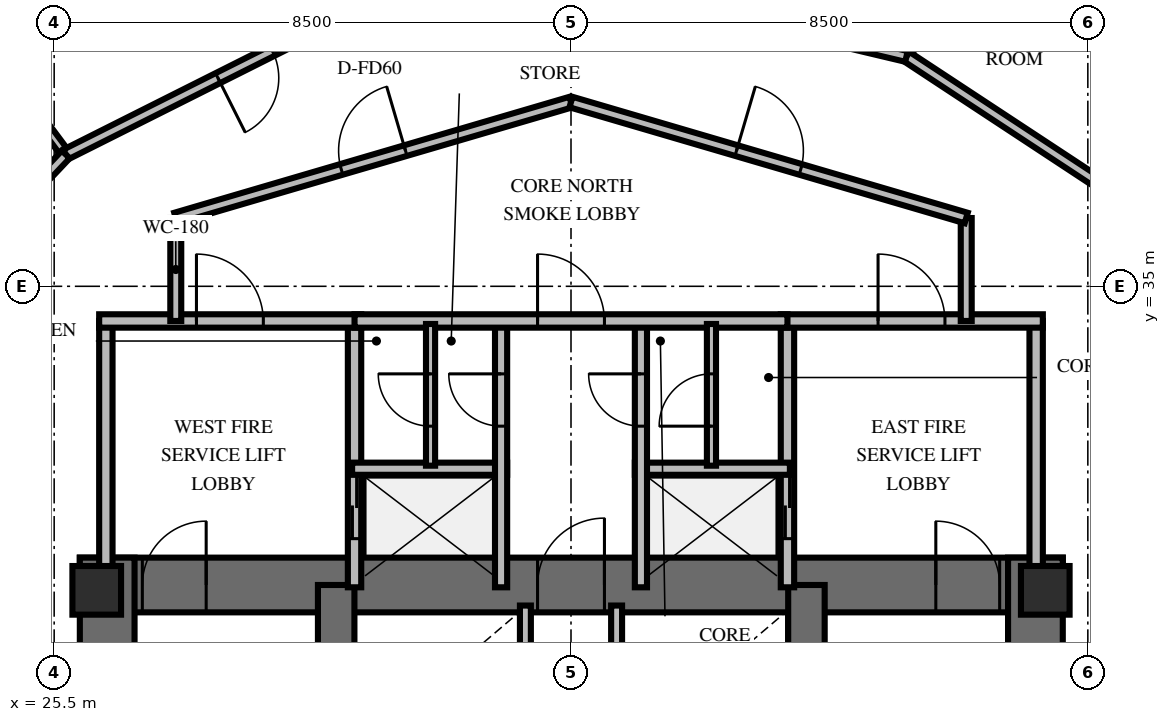
"""IFC4 building model, lengths in metres.
Left out: names, types, materials, properties, quantities, classifications, styles, units other than length and angle.
Written with IfcOpenShell. Run it as: python <this file> out.ifc"""

import sys

from ifc_helpers import new_model, si_unit, direction, frame, frame_2d, origin, origin_2d, place, context, subcontext, project, spatial, rectangle, extrude, element, fill, save


model = new_model("IFC4")
c1 = context("Model", 3, precision=1e-05, world=origin(), true_north=direction((0.0, 1.0)))
c2 = subcontext(c1, "Body", "Model", "MODEL_VIEW")
j1 = project(units=[si_unit("LENGTHUNIT", "METRE"), si_unit("PLANEANGLEUNIT", "RADIAN")], contexts=[c1])
p1 = place(None, origin())
s1 = spatial("IfcSite", under=j1, at=p1, CompositionType="ELEMENT")
p2 = place(p1, origin())
s2 = spatial("IfcBuilding", under=s1, at=p2, CompositionType="ELEMENT")
p3 = place(p2, frame((0.0, 0.0, 59.4)))
s3 = spatial("IfcBuildingStorey", under=s2, at=p3, CompositionType="ELEMENT", Elevation=59.4)
p4 = place(p3, frame((25.922, 30.088, 0.0), z_axis=(0.0, 0.0, 1.0), x_axis=(1.0, 0.0, 0.0)))
e1 = element("IfcWall", 1, at=p4, inside=s3, PredefinedType="SHEAR", context=c2, shape_type="SweptSolid", body=[
    extrude(rectangle(XDim=16.166, YDim=0.9, at=frame_2d((8.083, 0.0))), origin(), (0.0, 0.0, 1.0), 4.2),
])
p5 = place(p4, frame((1.028, 0.0, 0.0)))
e2 = element("IfcOpeningElement", 2, at=p5, cuts=e1, PredefinedType="OPENING", context=c2, shape_type="SweptSolid", body=[
    extrude(rectangle(XDim=1.05, YDim=2.15, at=frame_2d((0.525, 1.075))), frame((0.0, 0.46, 0.0), z_axis=(0.0, -1.0, 0.0), x_axis=(1.0, 0.0, 0.0)), (0.0, 0.0, 1.0), 0.92),
])
p6 = place(p4, frame((14.078, 0.0, 0.0)))
e3 = element("IfcOpeningElement", 3, at=p6, cuts=e1, PredefinedType="OPENING", context=c2, shape_type="SweptSolid", body=[
    extrude(rectangle(XDim=1.05, YDim=2.15, at=frame_2d((0.525, 1.075))), frame((0.0, 0.46, 0.0), z_axis=(0.0, -1.0, 0.0), x_axis=(1.0, 0.0, 0.0)), (0.0, 0.0, 1.0), 0.92),
])
p7 = place(p4, frame((7.528, 0.0, 0.0)))
e4 = element("IfcOpeningElement", 4, at=p7, cuts=e1, PredefinedType="OPENING", context=c2, shape_type="SweptSolid", body=[
    extrude(rectangle(XDim=1.1, YDim=2.15, at=frame_2d((0.55, 1.075))), frame((0.0, 0.46, 0.0), z_axis=(0.0, -1.0, 0.0), x_axis=(1.0, 0.0, 0.0)), (0.0, 0.0, 1.0), 0.92),
])
for number, where, z_axis, x_axis in (
    (5, (26.372, 19.662, 0.0), (0.0, 0.0, 1.0), (0.0, 1.0, 0.0)),
    (6, (41.638, 19.662, 0.0), (0.0, 0.0, 1.0), (0.0, 1.0, 0.0)),
):
    element("IfcWall", number, at=place(p3, frame(where, z_axis=z_axis, x_axis=x_axis)), inside=s3, PredefinedType="SHEAR", context=c2, shape_type="SweptSolid", body=[
        extrude(rectangle(XDim=10.876, YDim=0.9, at=frame_2d((5.438, 0.0))), origin(), (0.0, 0.0, 1.0), 4.2),
    ])
for number, where, z_axis, x_axis in (
    (7, (30.138, 20.112, 0.0), (0.0, 0.0, 1.0), (0.0, 1.0, 0.0)),
    (8, (37.872, 20.112, 0.0), (0.0, 0.0, 1.0), (0.0, 1.0, 0.0)),
):
    element("IfcWall", number, at=place(p3, frame(where, z_axis=z_axis, x_axis=x_axis)), inside=s3, PredefinedType="SHEAR", context=c2, shape_type="SweptSolid", body=[
        extrude(rectangle(XDim=9.976, YDim=0.6, at=frame_2d((4.988, 0.0))), origin(), (0.0, 0.0, 1.0), 4.2),
    ])
for number, where, z_axis, x_axis in (
    (9, (26.2, 30.0, 0.0), (0.0, 0.0, 1.0), (1.0, 0.0, 0.0)),
    (10, (41.8, 30.0, 0.0), (0.0, 0.0, 1.0), (1.0, 0.0, 0.0)),
):
    element("IfcColumn", number, at=place(p3, frame(where, z_axis=z_axis, x_axis=x_axis)), inside=s3, PredefinedType="PILASTER", context=c2, shape_type="SweptSolid", body=[
        extrude(rectangle(XDim=0.8, YDim=0.8, at=origin_2d()), origin(), (0.0, 0.0, 1.0), 4.2),
    ])
p8 = place(p3, frame((26.35, 30.05, 0.0), z_axis=(0.0, 0.0, 1.0), x_axis=(0.0, 1.0, 0.0)))
e11 = element("IfcWall", 11, at=p8, inside=s3, PredefinedType="SOLIDWALL", context=c2, shape_type="SweptSolid", body=[
    extrude(rectangle(XDim=4.38, YDim=0.22, at=frame_2d((2.19, 0.0))), origin(), (0.0, 0.0, 1.0), 3.0),
])
p9 = place(p3, frame((30.44, 30.05, 0.0), z_axis=(0.0, 0.0, 1.0), x_axis=(0.0, 1.0, 0.0)))
e12 = element("IfcWall", 12, at=p9, inside=s3, PredefinedType="SOLIDWALL", context=c2, shape_type="SweptSolid", body=[
    extrude(rectangle(XDim=4.38, YDim=0.22, at=frame_2d((2.19, 0.0))), origin(), (0.0, 0.0, 1.0), 3.0),
])
p10 = place(p9, frame((0.8, 0.0, 0.0)))
e13 = element("IfcOpeningElement", 13, at=p10, cuts=e12, PredefinedType="OPENING", context=c2, shape_type="SweptSolid", body=[
    extrude(rectangle(XDim=1.05, YDim=2.1, at=frame_2d((0.525, 1.05))), frame((0.0, 0.12, 0.0), z_axis=(0.0, -1.0, 0.0), x_axis=(1.0, 0.0, 0.0)), (0.0, 0.0, 1.0), 0.24),
])
p11 = place(p3, frame((26.24, 34.43, 0.0), z_axis=(0.0, 0.0, 1.0), x_axis=(1.0, 0.0, 0.0)))
e14 = element("IfcWall", 14, at=p11, inside=s3, PredefinedType="SOLIDWALL", context=c2, shape_type="SweptSolid", body=[
    extrude(rectangle(XDim=4.31, YDim=0.22, at=frame_2d((2.155, 0.0))), origin(), (0.0, 0.0, 1.0), 3.0),
])
p12 = place(p11, frame((1.6, 0.0, 0.0)))
e15 = element("IfcOpeningElement", 15, at=p12, cuts=e14, PredefinedType="OPENING", context=c2, shape_type="SweptSolid", body=[
    extrude(rectangle(XDim=1.1, YDim=2.15, at=frame_2d((0.55, 1.075))), frame((0.0, 0.12, 0.0), z_axis=(0.0, -1.0, 0.0), x_axis=(1.0, 0.0, 0.0)), (0.0, 0.0, 1.0), 0.24),
])
p13 = place(p3, frame((30.4, 32.0, 0.0), z_axis=(0.0, 0.0, 1.0), x_axis=(1.0, 0.0, 0.0)))
e16 = element("IfcWall", 16, at=p13, inside=s3, PredefinedType="SOLIDWALL", context=c2, shape_type="SweptSolid", body=[
    extrude(rectangle(XDim=2.55, YDim=0.2, at=frame_2d((1.275, 0.0))), origin(), (0.0, 0.0, 1.0), 3.0),
])
p14 = place(p3, frame((32.85, 30.05, 0.0), z_axis=(0.0, 0.0, 1.0), x_axis=(0.0, 1.0, 0.0)))
e17 = element("IfcWall", 17, at=p14, inside=s3, PredefinedType="SOLIDWALL", context=c2, shape_type="SweptSolid", body=[
    extrude(rectangle(XDim=4.38, YDim=0.2, at=frame_2d((2.19, 0.0))), origin(), (0.0, 0.0, 1.0), 3.0),
])
p15 = place(p14, frame((2.65, 0.0, 0.0)))
e18 = element("IfcOpeningElement", 18, at=p15, cuts=e17, PredefinedType="OPENING", context=c2, shape_type="SweptSolid", body=[
    extrude(rectangle(XDim=0.86, YDim=2.05, at=frame_2d((0.43, 1.025))), frame((0.0, 0.11, 0.0), z_axis=(0.0, -1.0, 0.0), x_axis=(1.0, 0.0, 0.0)), (0.0, 0.0, 1.0), 0.22),
])
p16 = place(p3, frame((37.56, 30.05, 0.0), z_axis=(0.0, 0.0, 1.0), x_axis=(0.0, 1.0, 0.0)))
e19 = element("IfcWall", 19, at=p16, inside=s3, PredefinedType="SOLIDWALL", context=c2, shape_type="SweptSolid", body=[
    extrude(rectangle(XDim=4.38, YDim=0.22, at=frame_2d((2.19, 0.0))), origin(), (0.0, 0.0, 1.0), 3.0),
])
p17 = place(p16, frame((0.8, 0.0, 0.0)))
e20 = element("IfcOpeningElement", 20, at=p17, cuts=e19, PredefinedType="OPENING", context=c2, shape_type="SweptSolid", body=[
    extrude(rectangle(XDim=1.05, YDim=2.1, at=frame_2d((0.525, 1.05))), frame((0.0, 0.12, 0.0), z_axis=(0.0, -1.0, 0.0), x_axis=(1.0, 0.0, 0.0)), (0.0, 0.0, 1.0), 0.24),
])
p18 = place(p3, frame((41.65, 30.05, 0.0), z_axis=(0.0, 0.0, 1.0), x_axis=(0.0, 1.0, 0.0)))
e21 = element("IfcWall", 21, at=p18, inside=s3, PredefinedType="SOLIDWALL", context=c2, shape_type="SweptSolid", body=[
    extrude(rectangle(XDim=4.38, YDim=0.22, at=frame_2d((2.19, 0.0))), origin(), (0.0, 0.0, 1.0), 3.0),
])
p19 = place(p3, frame((37.45, 34.43, 0.0), z_axis=(0.0, 0.0, 1.0), x_axis=(1.0, 0.0, 0.0)))
e22 = element("IfcWall", 22, at=p19, inside=s3, PredefinedType="SOLIDWALL", context=c2, shape_type="SweptSolid", body=[
    extrude(rectangle(XDim=4.31, YDim=0.22, at=frame_2d((2.155, 0.0))), origin(), (0.0, 0.0, 1.0), 3.0),
])
p20 = place(p19, frame((1.6, 0.0, 0.0)))
e23 = element("IfcOpeningElement", 23, at=p20, cuts=e22, PredefinedType="OPENING", context=c2, shape_type="SweptSolid", body=[
    extrude(rectangle(XDim=1.1, YDim=2.15, at=frame_2d((0.55, 1.075))), frame((0.0, 0.12, 0.0), z_axis=(0.0, -1.0, 0.0), x_axis=(1.0, 0.0, 0.0)), (0.0, 0.0, 1.0), 0.24),
])
p21 = place(p3, frame((35.05, 32.0, 0.0), z_axis=(0.0, 0.0, 1.0), x_axis=(1.0, 0.0, 0.0)))
e24 = element("IfcWall", 24, at=p21, inside=s3, PredefinedType="SOLIDWALL", context=c2, shape_type="SweptSolid", body=[
    extrude(rectangle(XDim=2.55, YDim=0.2, at=frame_2d((1.275, 0.0))), origin(), (0.0, 0.0, 1.0), 3.0),
])
p22 = place(p3, frame((35.15, 30.05, 0.0), z_axis=(0.0, 0.0, 1.0), x_axis=(0.0, 1.0, 0.0)))
e25 = element("IfcWall", 25, at=p22, inside=s3, PredefinedType="SOLIDWALL", context=c2, shape_type="SweptSolid", body=[
    extrude(rectangle(XDim=4.38, YDim=0.2, at=frame_2d((2.19, 0.0))), origin(), (0.0, 0.0, 1.0), 3.0),
])
p23 = place(p22, frame((2.65, 0.0, 0.0)))
e26 = element("IfcOpeningElement", 26, at=p23, cuts=e25, PredefinedType="OPENING", context=c2, shape_type="SweptSolid", body=[
    extrude(rectangle(XDim=0.86, YDim=2.05, at=frame_2d((0.43, 1.025))), frame((0.0, 0.11, 0.0), z_axis=(0.0, -1.0, 0.0), x_axis=(1.0, 0.0, 0.0)), (0.0, 0.0, 1.0), 0.22),
])
p24 = place(p3, frame((30.44, 34.43, 0.0), z_axis=(0.0, 0.0, 1.0), x_axis=(1.0, 0.0, 0.0)))
e27 = element("IfcWall", 27, at=p24, inside=s3, PredefinedType="SOLIDWALL", context=c2, shape_type="SweptSolid", body=[
    extrude(rectangle(XDim=7.12, YDim=0.22, at=frame_2d((3.56, 0.0))), origin(), (0.0, 0.0, 1.0), 3.0),
])
p25 = place(p24, frame((3.01, 0.0, 0.0)))
e28 = element("IfcOpeningElement", 28, at=p25, cuts=e27, PredefinedType="OPENING", context=c2, shape_type="SweptSolid", body=[
    extrude(rectangle(XDim=1.1, YDim=2.15, at=frame_2d((0.55, 1.075))), frame((0.0, 0.12, 0.0), z_axis=(0.0, -1.0, 0.0), x_axis=(1.0, 0.0, 0.0)), (0.0, 0.0, 1.0), 0.24),
])
p26 = place(p3, frame((31.69, 32.05, 0.0), z_axis=(0.0, 0.0, 1.0), x_axis=(0.0, 1.0, 0.0)))
e29 = element("IfcWall", 29, at=p26, inside=s3, PredefinedType="PARTITIONING", context=c2, shape_type="SweptSolid", body=[
    extrude(rectangle(XDim=2.33, YDim=0.15, at=frame_2d((1.165, 0.0))), origin(), (0.0, 0.0, 1.0), 3.0),
])
p27 = place(p26, frame((0.65, 0.0, 0.0)))
e30 = element("IfcOpeningElement", 30, at=p27, cuts=e29, PredefinedType="OPENING", context=c2, shape_type="SweptSolid", body=[
    extrude(rectangle(XDim=0.86, YDim=2.05, at=frame_2d((0.43, 1.025))), frame((0.0, 0.085, 0.0), z_axis=(0.0, -1.0, 0.0), x_axis=(1.0, 0.0, 0.0)), (0.0, 0.0, 1.0), 0.17),
])
p28 = place(p3, frame((36.31, 32.05, 0.0), z_axis=(0.0, 0.0, 1.0), x_axis=(0.0, 1.0, 0.0)))
e31 = element("IfcWall", 31, at=p28, inside=s3, PredefinedType="PARTITIONING", context=c2, shape_type="SweptSolid", body=[
    extrude(rectangle(XDim=2.33, YDim=0.15, at=frame_2d((1.165, 0.0))), origin(), (0.0, 0.0, 1.0), 3.0),
])
p29 = place(p28, frame((0.65, 0.0, 0.0)))
e32 = element("IfcOpeningElement", 32, at=p29, cuts=e31, PredefinedType="OPENING", context=c2, shape_type="SweptSolid", body=[
    extrude(rectangle(XDim=0.86, YDim=2.05, at=frame_2d((0.43, 1.025))), frame((0.0, 0.085, 0.0), z_axis=(0.0, -1.0, 0.0), x_axis=(1.0, 0.0, 0.0)), (0.0, 0.0, 1.0), 0.17),
])
for number, where, z_axis, x_axis in (
    (33, (33.25, 27.28, 0.0), (0.0, 0.0, 1.0), (0.0, 1.0, 0.0)),
    (34, (34.75, 27.28, 0.0), (0.0, 0.0, 1.0), (0.0, 1.0, 0.0)),
):
    element("IfcWall", number, at=place(p3, frame(where, z_axis=z_axis, x_axis=x_axis)), inside=s3, PredefinedType="SOLIDWALL", context=c2, shape_type="SweptSolid", body=[
        extrude(rectangle(XDim=2.47, YDim=0.18, at=frame_2d((1.235, 0.0))), origin(), (0.0, 0.0, 1.0), 3.0),
    ])
for number, where, z_axis, x_axis in (
    (35, (27.5, 34.43, 0.0), (0.0, 0.0, 1.0), (0.0, 1.0, 0.0)),
    (36, (40.5, 36.123, 0.0), (0.0, 0.0, 1.0), (0.0, -1.0, 0.0)),
):
    element("IfcWall", number, at=place(p3, frame(where, z_axis=z_axis, x_axis=x_axis)), inside=s3, PredefinedType="PARTITIONING", context=c2, shape_type="SweptSolid", body=[
        extrude(rectangle(XDim=1.693, YDim=0.18, at=frame_2d((0.846, 0.0))), origin(), (0.0, 0.0, 1.0), 3.0),
    ])
p30 = place(p3, frame((27.5, 36.123, 0.0), z_axis=(0.0, 0.0, 1.0), x_axis=(0.959546654541, 0.281549671923, 0.0)))
e37 = element("IfcWall", 37, at=p30, inside=s3, PredefinedType="PARTITIONING", context=c2, shape_type="SweptSolid", body=[
    extrude(rectangle(XDim=6.774, YDim=0.18, at=frame_2d((3.387, 0.0))), origin(), (0.0, 0.0, 1.0), 3.0),
])
p31 = place(p30, frame((2.837, 0.0, 0.0)))
e38 = element("IfcOpeningElement", 38, at=p31, cuts=e37, PredefinedType="OPENING", context=c2, shape_type="SweptSolid", body=[
    extrude(rectangle(XDim=1.1, YDim=2.15, at=frame_2d((0.55, 1.075))), frame((0.0, 0.1, 0.0), z_axis=(0.0, -1.0, 0.0), x_axis=(1.0, 0.0, 0.0)), (0.0, 0.0, 1.0), 0.2),
])
p32 = place(p3, frame((34.0, 38.03, 0.0), z_axis=(0.0, 0.0, 1.0), x_axis=(0.959546654541, -0.281549671923, 0.0)))
e39 = element("IfcWall", 39, at=p32, inside=s3, PredefinedType="PARTITIONING", context=c2, shape_type="SweptSolid", body=[
    extrude(rectangle(XDim=6.774, YDim=0.18, at=frame_2d((3.387, 0.0))), origin(), (0.0, 0.0, 1.0), 3.0),
])
p33 = place(p32, frame((2.837, 0.0, 0.0)))
e40 = element("IfcOpeningElement", 40, at=p33, cuts=e39, PredefinedType="OPENING", context=c2, shape_type="SweptSolid", body=[
    extrude(rectangle(XDim=1.1, YDim=2.15, at=frame_2d((0.55, 1.075))), frame((0.0, 0.1, 0.0), z_axis=(0.0, -1.0, 0.0), x_axis=(1.0, 0.0, 0.0)), (0.0, 0.0, 1.0), 0.2),
])
p34 = place(p3, frame((39.517, 38.78, 0.0), z_axis=(0.0, 0.0, 1.0), x_axis=(0.396341092722, 0.918103337441, 0.0)))
e41 = element("IfcWall", 41, at=p34, inside=s3, PredefinedType="PARTITIONING", context=c2, shape_type="SweptSolid", body=[
    extrude(rectangle(XDim=8.573, YDim=0.15, at=frame_2d((4.286, 0.0))), origin(), (0.0, 0.0, 1.0), 3.0),
])
p35 = place(p3, frame((43.555, 36.122, 0.0), z_axis=(0.0, 0.0, 1.0), x_axis=(-0.835329812405, 0.549749128701, 0.0)))
e42 = element("IfcWall", 42, at=p35, inside=s3, PredefinedType="PARTITIONING", context=c2, shape_type="SweptSolid", body=[
    extrude(rectangle(XDim=4.834, YDim=0.18, at=frame_2d((2.417, 0.0))), origin(), (0.0, 0.0, 1.0), 3.0),
])
p36 = place(p3, frame((45.134, 37.795, 0.0), z_axis=(0.0, 0.0, 1.0), x_axis=(-0.835342710948, 0.549729529193, 0.0)))
e43 = element("IfcWall", 43, at=p36, inside=s3, PredefinedType="PARTITIONING", context=c2, shape_type="SweptSolid", body=[
    extrude(rectangle(XDim=5.633, YDim=0.15, at=frame_2d((2.816, 0.0))), origin(), (0.0, 0.0, 1.0), 3.0),
])
p37 = place(p3, frame((25.691, 37.168, 0.0), z_axis=(0.0, 0.0, 1.0), x_axis=(-0.596933618422, 0.802290630132, 0.0)))
e44 = element("IfcWall", 44, at=p37, inside=s3, PredefinedType="PARTITIONING", context=c2, shape_type="SweptSolid", body=[
    extrude(rectangle(XDim=8.573, YDim=0.15, at=frame_2d((4.286, 0.0))), origin(), (0.0, 0.0, 1.0), 3.0),
])
p38 = place(p3, frame((39.517, 38.78, 0.0), z_axis=(0.0, 0.0, 1.0), x_axis=(-0.97297826036, 0.230896740702, 0.0)))
e45 = element("IfcWall", 45, at=p38, inside=s3, PredefinedType="PARTITIONING", context=c2, shape_type="SweptSolid", body=[
    extrude(rectangle(XDim=4.834, YDim=0.18, at=frame_2d((2.417, 0.0))), origin(), (0.0, 0.0, 1.0), 3.0),
])
p39 = place(p3, frame((30.012, 39.336, 0.0), z_axis=(0.0, 0.0, 1.0), x_axis=(-0.893759589468, -0.44854631448, 0.0)))
e46 = element("IfcWall", 46, at=p39, inside=s3, PredefinedType="PARTITIONING", context=c2, shape_type="SweptSolid", body=[
    extrude(rectangle(XDim=4.834, YDim=0.18, at=frame_2d((2.417, 0.0))), origin(), (0.0, 0.0, 1.0), 3.0),
])
p40 = place(p39, frame((1.034, 0.0, 0.0)))
e47 = element("IfcOpeningElement", 47, at=p40, cuts=e46, PredefinedType="OPENING", context=c2, shape_type="SweptSolid", body=[
    extrude(rectangle(XDim=1.0, YDim=2.15, at=frame_2d((0.5, 1.075))), frame((0.0, 0.1, 0.0), z_axis=(0.0, -1.0, 0.0), x_axis=(1.0, 0.0, 0.0)), (0.0, 0.0, 1.0), 0.2),
])
p41 = place(p3, frame((25.691, 37.168, 0.0), z_axis=(0.0, 0.0, 1.0), x_axis=(-0.68646187942, -0.727165791346, 0.0)))
e48 = element("IfcWall", 48, at=p41, inside=s3, PredefinedType="PARTITIONING", context=c2, shape_type="SweptSolid", body=[
    extrude(rectangle(XDim=4.834, YDim=0.18, at=frame_2d((2.417, 0.0))), origin(), (0.0, 0.0, 1.0), 3.0),
])
p42 = place(p5, origin())
e49 = element("IfcDoor", 49, at=p42, inside=s3, OperationType="SINGLE_SWING_RIGHT", PredefinedType="DOOR", context=c2, shape_type="SweptSolid", body=[
    extrude(rectangle(XDim=1.05, YDim=2.15, at=frame_2d((0.525, 1.075))), frame((0.0, 0.025, 0.0), z_axis=(0.0, -1.0, 0.0), x_axis=(1.0, 0.0, 0.0)), (0.0, 0.0, 1.0), 0.05),
])
fill(e2, e49)
p43 = place(p6, origin())
e50 = element("IfcDoor", 50, at=p43, inside=s3, OperationType="SINGLE_SWING_LEFT", PredefinedType="DOOR", context=c2, shape_type="SweptSolid", body=[
    extrude(rectangle(XDim=1.05, YDim=2.15, at=frame_2d((0.525, 1.075))), frame((0.0, 0.025, 0.0), z_axis=(0.0, -1.0, 0.0), x_axis=(1.0, 0.0, 0.0)), (0.0, 0.0, 1.0), 0.05),
])
fill(e3, e50)
p44 = place(p7, origin())
e51 = element("IfcDoor", 51, at=p44, inside=s3, OperationType="SINGLE_SWING_RIGHT", PredefinedType="DOOR", context=c2, shape_type="SweptSolid", body=[
    extrude(rectangle(XDim=1.1, YDim=2.15, at=frame_2d((0.55, 1.075))), frame((0.0, 0.025, 0.0), z_axis=(0.0, -1.0, 0.0), x_axis=(1.0, 0.0, 0.0)), (0.0, 0.0, 1.0), 0.05),
])
fill(e4, e51)
p45 = place(p12, origin())
e52 = element("IfcDoor", 52, at=p45, inside=s3, OperationType="SINGLE_SWING_LEFT", PredefinedType="DOOR", context=c2, shape_type="SweptSolid", body=[
    extrude(rectangle(XDim=1.1, YDim=2.15, at=frame_2d((0.55, 1.075))), frame((0.0, 0.025, 0.0), z_axis=(0.0, -1.0, 0.0), x_axis=(1.0, 0.0, 0.0)), (0.0, 0.0, 1.0), 0.05),
])
fill(e15, e52)
p46 = place(p10, origin())
e53 = element("IfcDoor", 53, at=p46, inside=s3, OperationType="DOUBLE_DOOR_SLIDING", PredefinedType="USERDEFINED", context=c2, shape_type="SweptSolid", body=[
    extrude(rectangle(XDim=1.05, YDim=2.1, at=frame_2d((0.525, 1.05))), frame((0.0, 0.025, 0.0), z_axis=(0.0, -1.0, 0.0), x_axis=(1.0, 0.0, 0.0)), (0.0, 0.0, 1.0), 0.05),
])
fill(e13, e53)
p47 = place(p15, origin())
e54 = element("IfcDoor", 54, at=p47, inside=s3, OperationType="SINGLE_SWING_RIGHT", PredefinedType="TRAPDOOR", context=c2, shape_type="SweptSolid", body=[
    extrude(rectangle(XDim=0.86, YDim=2.05, at=frame_2d((0.43, 1.025))), frame((0.0, 0.025, 0.0), z_axis=(0.0, -1.0, 0.0), x_axis=(1.0, 0.0, 0.0)), (0.0, 0.0, 1.0), 0.05),
])
fill(e18, e54)
p48 = place(p20, origin())
e55 = element("IfcDoor", 55, at=p48, inside=s3, OperationType="SINGLE_SWING_LEFT", PredefinedType="DOOR", context=c2, shape_type="SweptSolid", body=[
    extrude(rectangle(XDim=1.1, YDim=2.15, at=frame_2d((0.55, 1.075))), frame((0.0, 0.025, 0.0), z_axis=(0.0, -1.0, 0.0), x_axis=(1.0, 0.0, 0.0)), (0.0, 0.0, 1.0), 0.05),
])
fill(e23, e55)
p49 = place(p17, origin())
e56 = element("IfcDoor", 56, at=p49, inside=s3, OperationType="DOUBLE_DOOR_SLIDING", PredefinedType="USERDEFINED", context=c2, shape_type="SweptSolid", body=[
    extrude(rectangle(XDim=1.05, YDim=2.1, at=frame_2d((0.525, 1.05))), frame((0.0, 0.025, 0.0), z_axis=(0.0, -1.0, 0.0), x_axis=(1.0, 0.0, 0.0)), (0.0, 0.0, 1.0), 0.05),
])
fill(e20, e56)
p50 = place(p23, origin())
e57 = element("IfcDoor", 57, at=p50, inside=s3, OperationType="SINGLE_SWING_RIGHT", PredefinedType="TRAPDOOR", context=c2, shape_type="SweptSolid", body=[
    extrude(rectangle(XDim=0.86, YDim=2.05, at=frame_2d((0.43, 1.025))), frame((0.0, 0.025, 0.0), z_axis=(0.0, -1.0, 0.0), x_axis=(1.0, 0.0, 0.0)), (0.0, 0.0, 1.0), 0.05),
])
fill(e26, e57)
p51 = place(p25, origin())
e58 = element("IfcDoor", 58, at=p51, inside=s3, OperationType="SINGLE_SWING_LEFT", PredefinedType="DOOR", context=c2, shape_type="SweptSolid", body=[
    extrude(rectangle(XDim=1.1, YDim=2.15, at=frame_2d((0.55, 1.075))), frame((0.0, 0.025, 0.0), z_axis=(0.0, -1.0, 0.0), x_axis=(1.0, 0.0, 0.0)), (0.0, 0.0, 1.0), 0.05),
])
fill(e28, e58)
p52 = place(p27, origin())
e59 = element("IfcDoor", 59, at=p52, inside=s3, OperationType="SINGLE_SWING_RIGHT", PredefinedType="TRAPDOOR", context=c2, shape_type="SweptSolid", body=[
    extrude(rectangle(XDim=0.86, YDim=2.05, at=frame_2d((0.43, 1.025))), frame((0.0, 0.025, 0.0), z_axis=(0.0, -1.0, 0.0), x_axis=(1.0, 0.0, 0.0)), (0.0, 0.0, 1.0), 0.05),
])
fill(e30, e59)
p53 = place(p29, origin())
e60 = element("IfcDoor", 60, at=p53, inside=s3, OperationType="SINGLE_SWING_LEFT", PredefinedType="TRAPDOOR", context=c2, shape_type="SweptSolid", body=[
    extrude(rectangle(XDim=0.86, YDim=2.05, at=frame_2d((0.43, 1.025))), frame((0.0, 0.025, 0.0), z_axis=(0.0, -1.0, 0.0), x_axis=(1.0, 0.0, 0.0)), (0.0, 0.0, 1.0), 0.05),
])
fill(e32, e60)
p54 = place(p31, origin())
e61 = element("IfcDoor", 61, at=p54, inside=s3, OperationType="SINGLE_SWING_RIGHT", PredefinedType="DOOR", context=c2, shape_type="SweptSolid", body=[
    extrude(rectangle(XDim=1.1, YDim=2.15, at=frame_2d((0.55, 1.075))), frame((0.0, 0.025, 0.0), z_axis=(0.0, -1.0, 0.0), x_axis=(1.0, 0.0, 0.0)), (0.0, 0.0, 1.0), 0.05),
])
fill(e38, e61)
p55 = place(p33, origin())
e62 = element("IfcDoor", 62, at=p55, inside=s3, OperationType="SINGLE_SWING_LEFT", PredefinedType="DOOR", context=c2, shape_type="SweptSolid", body=[
    extrude(rectangle(XDim=1.1, YDim=2.15, at=frame_2d((0.55, 1.075))), frame((0.0, 0.025, 0.0), z_axis=(0.0, -1.0, 0.0), x_axis=(1.0, 0.0, 0.0)), (0.0, 0.0, 1.0), 0.05),
])
fill(e40, e62)
p56 = place(p40, origin())
e63 = element("IfcDoor", 63, at=p56, inside=s3, OperationType="SINGLE_SWING_RIGHT", PredefinedType="DOOR", context=c2, shape_type="SweptSolid", body=[
    extrude(rectangle(XDim=1.0, YDim=2.15, at=frame_2d((0.5, 1.075))), frame((0.0, 0.025, 0.0), z_axis=(0.0, -1.0, 0.0), x_axis=(1.0, 0.0, 0.0)), (0.0, 0.0, 1.0), 0.05),
])
fill(e47, e63)
save(model, sys.argv[1])
